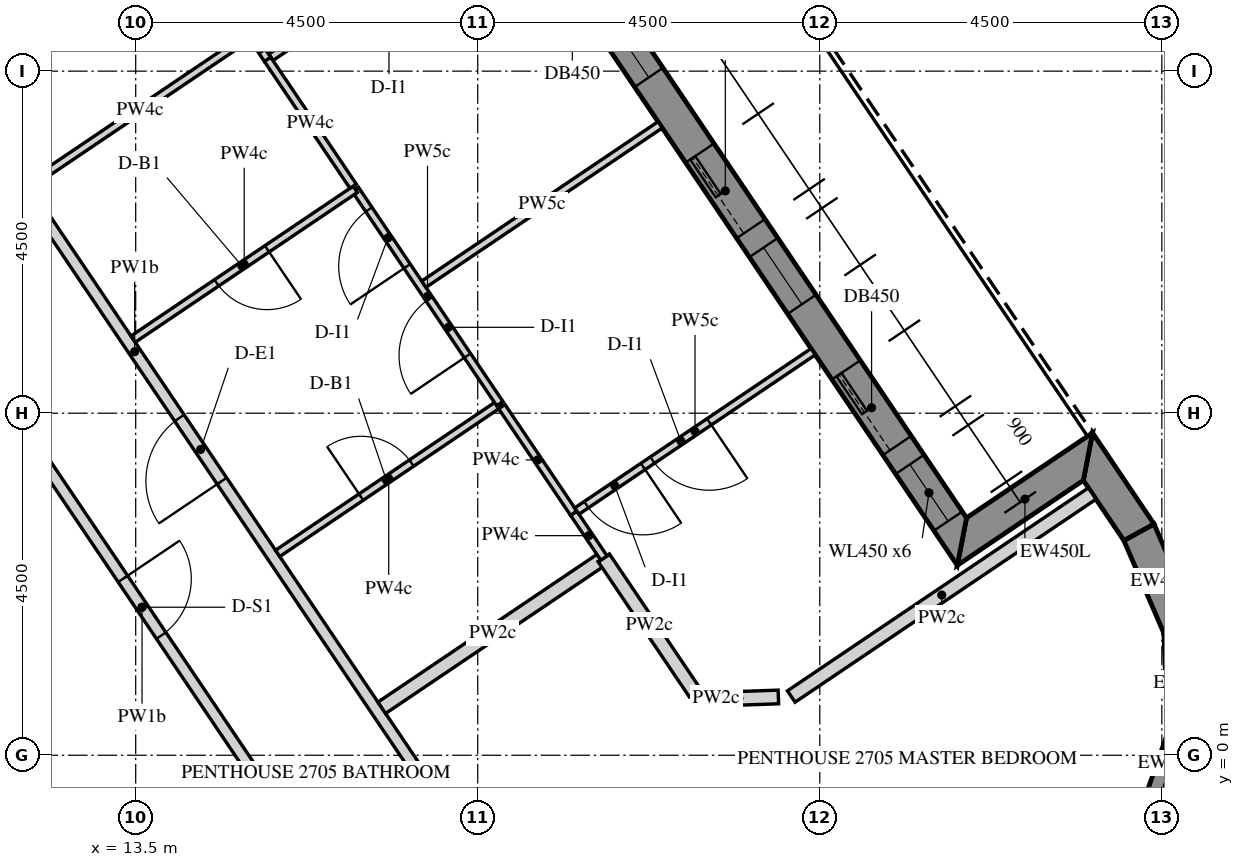
"""IFC4 building model, lengths in metres.
Left out: names, types, materials, properties, quantities, classifications, styles, units other than length and angle.
Written with IfcOpenShell. Run it as: python <this file> out.ifc"""

import sys

from ifc_helpers import new_model, si_unit, direction, frame, frame_2d, origin, place, context, subcontext, project, spatial, polyline, rectangle, outline, extrude, element, fill, save


model = new_model("IFC4")
c1 = context("Model", 3, precision=1e-05, world=origin(), true_north=direction((0.0, 1.0)))
c2 = subcontext(c1, "Body", "Model", "MODEL_VIEW")
j1 = project(units=[si_unit("LENGTHUNIT", "METRE"), si_unit("PLANEANGLEUNIT", "RADIAN")], contexts=[c1])
p1 = place(None, origin())
s1 = spatial("IfcSite", under=j1, at=p1, CompositionType="ELEMENT")
p2 = place(p1, origin())
s2 = spatial("IfcBuilding", under=s1, at=p2, CompositionType="ELEMENT")
p3 = place(p2, frame((0.0, 0.0, 353.4)))
s3 = spatial("IfcBuildingStorey", under=s2, at=p3, CompositionType="ELEMENT", Elevation=353.4)
p4 = place(p3, frame((26.838, -1.064, -0.15), z_axis=(0.0, 0.0, 1.0), x_axis=(0.331074067573, 0.943604769901, 0.0)))
e1 = element("IfcWall", 1, at=p4, inside=s3, PredefinedType="SOLIDWALL", context=c2, shape_type="SweptSolid", body=[
    extrude(outline(polyline([(-0.021, -0.225), (1.44, -0.225), (1.355, 0.225), (0.021, 0.225), (-0.021, -0.225)])), origin(), (0.0, 0.0, 1.0), 3.9),
])
p5 = place(p3, frame((27.301, 0.254, -0.15), z_axis=(0.0, 0.0, 1.0), x_axis=(-0.034763104447, 0.999395580623, 0.0)))
e2 = element("IfcWall", 2, at=p5, inside=s3, PredefinedType="SOLIDWALL", context=c2, shape_type="SweptSolid", body=[
    extrude(outline(polyline([(-0.042, -0.225), (1.44, -0.225), (1.355, 0.225), (0.042, 0.225), (-0.042, -0.225)])), origin(), (0.0, 0.0, 1.0), 3.9),
])
p6 = place(p3, frame((27.252, 1.651, -0.15), z_axis=(0.0, 0.0, 1.0), x_axis=(-0.396195073027, 0.918166359713, 0.0)))
e3 = element("IfcWall", 3, at=p6, inside=s3, PredefinedType="SOLIDWALL", context=c2, shape_type="SweptSolid", body=[
    extrude(outline(polyline([(-0.042, -0.225), (1.418, -0.225), (1.376, 0.225), (0.042, 0.225), (-0.042, -0.225)])), origin(), (0.0, 0.0, 1.0), 3.9),
])
p7 = place(p3, frame((26.699, 2.934, -0.15), z_axis=(0.0, 0.0, 1.0), x_axis=(-0.559105892217, 0.829096255744, 0.0)))
e4 = element("IfcWall", 4, at=p7, inside=s3, PredefinedType="SOLIDWALL", context=c2, shape_type="SweptSolid", body=[
    extrude(outline(polyline([(-0.021, -0.225), (1.425, -0.225), (0.975, 0.225), (0.021, 0.225), (-0.021, -0.225)])), origin(), (0.0, 0.0, 1.0), 3.9),
])
p8 = place(p3, frame((26.028, 3.929, -0.15), z_axis=(0.0, 0.0, 1.0), x_axis=(-0.829052389485, -0.559170935841, 0.0)))
e5 = element("IfcWall", 5, at=p8, inside=s3, PredefinedType="SOLIDWALL", context=c2, shape_type="SweptSolid", body=[
    extrude(outline(polyline([(-0.225, -0.225), (1.775, -0.225), (2.225, 0.225), (0.225, 0.225), (-0.225, -0.225)])), origin(), (0.0, 0.0, 1.0), 3.9),
])
p9 = place(p3, frame((24.37, 2.811, -0.15), z_axis=(0.0, 0.0, 1.0), x_axis=(-0.559187034749, 0.829041531027, 0.0)))
e6 = element("IfcWall", 6, at=p9, inside=s3, PredefinedType="SOLIDWALL", context=c2, shape_type="SweptSolid", body=[
    extrude(outline(polyline([(0.225, -0.225), (20.506, -0.225), (20.957, 0.225), (-0.225, 0.225), (0.225, -0.225)])), origin(), (0.0, 0.0, 1.0), 3.9),
])
p10 = place(p9, frame((0.325, 0.0, 1.05)))
e7 = element("IfcOpeningElement", 7, at=p10, cuts=e6, PredefinedType="OPENING", context=c2, shape_type="SweptSolid", body=[
    extrude(rectangle(XDim=0.9, YDim=1.5, at=frame_2d((0.45, 0.75))), frame((0.0, 0.235, 0.0), z_axis=(0.0, -1.0, 0.0), x_axis=(1.0, 0.0, 0.0)), (0.0, 0.0, 1.0), 0.47),
])
p11 = place(p9, frame((1.525, 0.0, 0.15)))
e8 = element("IfcOpeningElement", 8, at=p11, cuts=e6, PredefinedType="OPENING", context=c2, shape_type="SweptSolid", body=[
    extrude(rectangle(XDim=1.2, YDim=2.4, at=frame_2d((0.6, 1.2))), frame((0.0, 0.235, 0.0), z_axis=(0.0, -1.0, 0.0), x_axis=(1.0, 0.0, 0.0)), (0.0, 0.0, 1.0), 0.47),
])
p12 = place(p9, frame((3.766, 0.0, 1.05)))
e9 = element("IfcOpeningElement", 9, at=p12, cuts=e6, PredefinedType="OPENING", context=c2, shape_type="SweptSolid", body=[
    extrude(rectangle(XDim=0.9, YDim=1.5, at=frame_2d((0.45, 0.75))), frame((0.0, 0.235, 0.0), z_axis=(0.0, -1.0, 0.0), x_axis=(1.0, 0.0, 0.0)), (0.0, 0.0, 1.0), 0.47),
])
p13 = place(p9, frame((4.966, 0.0, 0.15)))
e10 = element("IfcOpeningElement", 10, at=p13, cuts=e6, PredefinedType="OPENING", context=c2, shape_type="SweptSolid", body=[
    extrude(rectangle(XDim=1.2, YDim=2.4, at=frame_2d((0.6, 1.2))), frame((0.0, 0.235, 0.0), z_axis=(0.0, -1.0, 0.0), x_axis=(1.0, 0.0, 0.0)), (0.0, 0.0, 1.0), 0.47),
])
p14 = place(p9, frame((7.366, 0.0, 1.05)))
e11 = element("IfcOpeningElement", 11, at=p14, cuts=e6, PredefinedType="OPENING", context=c2, shape_type="SweptSolid", body=[
    extrude(rectangle(XDim=0.9, YDim=1.5, at=frame_2d((0.45, 0.75))), frame((0.0, 0.235, 0.0), z_axis=(0.0, -1.0, 0.0), x_axis=(1.0, 0.0, 0.0)), (0.0, 0.0, 1.0), 0.47),
])
p15 = place(p9, frame((8.566, 0.0, 0.15)))
e12 = element("IfcOpeningElement", 12, at=p15, cuts=e6, PredefinedType="OPENING", context=c2, shape_type="SweptSolid", body=[
    extrude(rectangle(XDim=1.2, YDim=2.4, at=frame_2d((0.6, 1.2))), frame((0.0, 0.235, 0.0), z_axis=(0.0, -1.0, 0.0), x_axis=(1.0, 0.0, 0.0)), (0.0, 0.0, 1.0), 0.47),
])
p16 = place(p9, frame((10.966, 0.0, 1.05)))
e13 = element("IfcOpeningElement", 13, at=p16, cuts=e6, PredefinedType="OPENING", context=c2, shape_type="SweptSolid", body=[
    extrude(rectangle(XDim=0.9, YDim=1.5, at=frame_2d((0.45, 0.75))), frame((0.0, 0.235, 0.0), z_axis=(0.0, -1.0, 0.0), x_axis=(1.0, 0.0, 0.0)), (0.0, 0.0, 1.0), 0.47),
])
p17 = place(p9, frame((12.166, 0.0, 0.15)))
e14 = element("IfcOpeningElement", 14, at=p17, cuts=e6, PredefinedType="OPENING", context=c2, shape_type="SweptSolid", body=[
    extrude(rectangle(XDim=1.2, YDim=2.4, at=frame_2d((0.6, 1.2))), frame((0.0, 0.235, 0.0), z_axis=(0.0, -1.0, 0.0), x_axis=(1.0, 0.0, 0.0)), (0.0, 0.0, 1.0), 0.47),
])
p18 = place(p9, frame((14.566, 0.0, 1.05)))
e15 = element("IfcOpeningElement", 15, at=p18, cuts=e6, PredefinedType="OPENING", context=c2, shape_type="SweptSolid", body=[
    extrude(rectangle(XDim=0.9, YDim=1.5, at=frame_2d((0.45, 0.75))), frame((0.0, 0.235, 0.0), z_axis=(0.0, -1.0, 0.0), x_axis=(1.0, 0.0, 0.0)), (0.0, 0.0, 1.0), 0.47),
])
p19 = place(p9, frame((15.766, 0.0, 0.15)))
e16 = element("IfcOpeningElement", 16, at=p19, cuts=e6, PredefinedType="OPENING", context=c2, shape_type="SweptSolid", body=[
    extrude(rectangle(XDim=1.2, YDim=2.4, at=frame_2d((0.6, 1.2))), frame((0.0, 0.235, 0.0), z_axis=(0.0, -1.0, 0.0), x_axis=(1.0, 0.0, 0.0)), (0.0, 0.0, 1.0), 0.47),
])
p20 = place(p9, frame((18.007, 0.0, 1.05)))
e17 = element("IfcOpeningElement", 17, at=p20, cuts=e6, PredefinedType="OPENING", context=c2, shape_type="SweptSolid", body=[
    extrude(rectangle(XDim=0.9, YDim=1.5, at=frame_2d((0.45, 0.75))), frame((0.0, 0.235, 0.0), z_axis=(0.0, -1.0, 0.0), x_axis=(1.0, 0.0, 0.0)), (0.0, 0.0, 1.0), 0.47),
])
p21 = place(p9, frame((19.207, 0.0, 0.15)))
e18 = element("IfcOpeningElement", 18, at=p21, cuts=e6, PredefinedType="OPENING", context=c2, shape_type="SweptSolid", body=[
    extrude(rectangle(XDim=1.2, YDim=2.4, at=frame_2d((0.6, 1.2))), frame((0.0, 0.235, 0.0), z_axis=(0.0, -1.0, 0.0), x_axis=(1.0, 0.0, 0.0)), (0.0, 0.0, 1.0), 0.47),
])
p22 = place(p3, frame((17.873, -1.193, 0.0), z_axis=(0.0, 0.0, 1.0), x_axis=(-0.559195650252, 0.829035719821, 0.0)))
e19 = element("IfcWall", 19, at=p22, inside=s3, PredefinedType="PARTITIONING", context=c2, shape_type="SweptSolid", body=[
    extrude(rectangle(XDim=15.688, YDim=0.15, at=frame_2d((7.844, 0.0))), origin(), (0.0, 0.0, 1.0), 2.82),
])
p23 = place(p22, frame((5.792, 0.0, 0.0)))
e20 = element("IfcOpeningElement", 20, at=p23, cuts=e19, PredefinedType="OPENING", context=c2, shape_type="SweptSolid", body=[
    extrude(rectangle(XDim=1.0, YDim=2.1, at=frame_2d((0.5, 1.05))), frame((0.0, 0.085, 0.0), z_axis=(0.0, -1.0, 0.0), x_axis=(1.0, 0.0, 0.0)), (0.0, 0.0, 1.0), 0.17),
])
p24 = place(p3, frame((11.368, 5.231, 0.0), z_axis=(0.0, 0.0, 1.0), x_axis=(0.55919388604, -0.829036909803, 0.0)))
e21 = element("IfcWall", 21, at=p24, inside=s3, PredefinedType="PARTITIONING", context=c2, shape_type="SweptSolid", body=[
    extrude(rectangle(XDim=7.922, YDim=0.15, at=frame_2d((3.961, 0.0))), origin(), (0.0, 0.0, 1.0), 2.82),
])
p25 = place(p24, frame((3.511, 0.0, 0.0)))
e22 = element("IfcOpeningElement", 22, at=p25, cuts=e21, PredefinedType="OPENING", context=c2, shape_type="SweptSolid", body=[
    extrude(rectangle(XDim=0.9, YDim=2.1, at=frame_2d((0.45, 1.05))), frame((0.0, 0.085, 0.0), z_axis=(0.0, -1.0, 0.0), x_axis=(1.0, 0.0, 0.0)), (0.0, 0.0, 1.0), 0.17),
])
p26 = place(p3, frame((19.66, 2.595, 0.0), z_axis=(0.0, 0.0, 1.0), x_axis=(-0.829033300448, -0.559199237078, 0.0)))
e23 = element("IfcWall", 23, at=p26, inside=s3, PredefinedType="PARTITIONING", context=c2, shape_type="SweptSolid", body=[
    extrude(rectangle(XDim=3.525, YDim=0.18, at=frame_2d((1.763, 0.0))), origin(), (0.0, 0.0, 1.0), 2.82),
])
p27 = place(p3, frame((26.084, 3.443, 0.0), z_axis=(0.0, 0.0, 1.0), x_axis=(-0.829033545972, -0.559198873079, 0.0)))
e24 = element("IfcWall", 24, at=p27, inside=s3, PredefinedType="PARTITIONING", context=c2, shape_type="SweptSolid", body=[
    extrude(rectangle(XDim=4.775, YDim=0.18, at=frame_2d((2.388, 0.0))), origin(), (0.0, 0.0, 1.0), 2.82),
])
p28 = place(p3, frame((21.955, 0.767, 0.0), z_axis=(0.0, 0.0, 1.0), x_axis=(-0.999394211814, -0.034802433729, 0.0)))
e25 = element("IfcWall", 25, at=p28, inside=s3, PredefinedType="PARTITIONING", context=c2, shape_type="SweptSolid", body=[
    extrude(rectangle(XDim=1.038, YDim=0.18, at=frame_2d((0.519, 0.0))), origin(), (0.0, 0.0, 1.0), 2.82),
])
p29 = place(p3, frame((20.858, 0.818, 0.0), z_axis=(0.0, 0.0, 1.0), x_axis=(-0.55920528272, 0.829029222512, 0.0)))
e26 = element("IfcWall", 26, at=p29, inside=s3, PredefinedType="PARTITIONING", context=c2, shape_type="SweptSolid", body=[
    extrude(rectangle(XDim=2.147, YDim=0.18, at=frame_2d((1.074, 0.0))), origin(), (0.0, 0.0, 1.0), 2.82),
])
p30 = place(p3, frame((15.278, 9.181, 0.0), z_axis=(0.0, 0.0, 1.0), x_axis=(0.829043350963, 0.559184336534, 0.0)))
e27 = element("IfcWall", 27, at=p30, inside=s3, PredefinedType="PARTITIONING", context=c2, shape_type="SweptSolid", body=[
    extrude(rectangle(XDim=3.75, YDim=0.1, at=frame_2d((1.875, 0.0))), origin(), (0.0, 0.0, 1.0), 2.82),
])
p31 = place(p30, frame((1.425, 0.0, 0.0)))
e28 = element("IfcOpeningElement", 28, at=p31, cuts=e27, PredefinedType="OPENING", context=c2, shape_type="SweptSolid", body=[
    extrude(rectangle(XDim=0.9, YDim=2.1, at=frame_2d((0.45, 1.05))), frame((0.0, 0.06, 0.0), z_axis=(0.0, -1.0, 0.0), x_axis=(1.0, 0.0, 0.0)), (0.0, 0.0, 1.0), 0.12),
])
p32 = place(p3, frame((12.096, 7.505, 0.0), z_axis=(0.0, 0.0, 1.0), x_axis=(0.829065408555, 0.559151632687, 0.0)))
e29 = element("IfcWall", 29, at=p32, inside=s3, PredefinedType="PARTITIONING", context=c2, shape_type="SweptSolid", body=[
    extrude(rectangle(XDim=3.525, YDim=0.1, at=frame_2d((1.762, 0.0))), origin(), (0.0, 0.0, 1.0), 2.82),
])
p33 = place(p3, frame((15.046, 9.435, 0.0), z_axis=(0.0, 0.0, 1.0), x_axis=(0.559141668278, -0.829072128826, 0.0)))
e30 = element("IfcWall", 30, at=p33, inside=s3, PredefinedType="PARTITIONING", context=c2, shape_type="SweptSolid", body=[
    extrude(rectangle(XDim=0.342, YDim=0.1, at=frame_2d((0.171, 0.0))), origin(), (0.0, 0.0, 1.0), 2.82),
])
p34 = place(p3, frame((15.367, 2.655, 0.0), z_axis=(0.0, 0.0, 1.0), x_axis=(0.829033300448, 0.559199237078, 0.0)))
e31 = element("IfcWall", 31, at=p34, inside=s3, PredefinedType="PARTITIONING", context=c2, shape_type="SweptSolid", body=[
    extrude(rectangle(XDim=3.525, YDim=0.1, at=frame_2d((1.763, 0.0))), origin(), (0.0, 0.0, 1.0), 2.82),
])
p35 = place(p34, frame((1.325, 0.0, 0.0)))
e32 = element("IfcOpeningElement", 32, at=p35, cuts=e31, PredefinedType="OPENING", context=c2, shape_type="SweptSolid", body=[
    extrude(rectangle(XDim=0.8, YDim=2.1, at=frame_2d((0.4, 1.05))), frame((0.0, 0.06, 0.0), z_axis=(0.0, -1.0, 0.0), x_axis=(1.0, 0.0, 0.0)), (0.0, 0.0, 1.0), 0.12),
])
p36 = place(p3, frame((18.291, 4.625, 0.0), z_axis=(0.0, 0.0, 1.0), x_axis=(-0.55916115895, 0.82905898362, 0.0)))
e33 = element("IfcWall", 33, at=p36, inside=s3, PredefinedType="PARTITIONING", context=c2, shape_type="SweptSolid", body=[
    extrude(rectangle(XDim=3.404, YDim=0.1, at=frame_2d((1.702, 0.0))), origin(), (0.0, 0.0, 1.0), 2.82),
])
p37 = place(p36, frame((0.762, 0.0, 0.0)))
e34 = element("IfcOpeningElement", 34, at=p37, cuts=e33, PredefinedType="OPENING", context=c2, shape_type="SweptSolid", body=[
    extrude(rectangle(XDim=0.9, YDim=2.1, at=frame_2d((0.45, 1.05))), frame((0.0, 0.06, 0.0), z_axis=(0.0, -1.0, 0.0), x_axis=(1.0, 0.0, 0.0)), (0.0, 0.0, 1.0), 0.12),
])
p38 = place(p36, frame((2.182, 0.0, 0.0)))
e35 = element("IfcOpeningElement", 35, at=p38, cuts=e33, PredefinedType="OPENING", context=c2, shape_type="SweptSolid", body=[
    extrude(rectangle(XDim=0.9, YDim=2.1, at=frame_2d((0.45, 1.05))), frame((0.0, 0.06, 0.0), z_axis=(0.0, -1.0, 0.0), x_axis=(1.0, 0.0, 0.0)), (0.0, 0.0, 1.0), 0.12),
])
p39 = place(p3, frame((16.388, 7.445, 0.0), z_axis=(0.0, 0.0, 1.0), x_axis=(-0.829033300448, -0.559199237078, 0.0)))
e36 = element("IfcWall", 36, at=p39, inside=s3, PredefinedType="PARTITIONING", context=c2, shape_type="SweptSolid", body=[
    extrude(rectangle(XDim=3.525, YDim=0.1, at=frame_2d((1.763, 0.0))), origin(), (0.0, 0.0, 1.0), 2.82),
])
p40 = place(p39, frame((1.4, 0.0, 0.0)))
e37 = element("IfcOpeningElement", 37, at=p40, cuts=e36, PredefinedType="OPENING", context=c2, shape_type="SweptSolid", body=[
    extrude(rectangle(XDim=0.8, YDim=2.1, at=frame_2d((0.4, 1.05))), frame((0.0, 0.06, 0.0), z_axis=(0.0, -1.0, 0.0), x_axis=(1.0, 0.0, 0.0)), (0.0, 0.0, 1.0), 0.12),
])
p41 = place(p3, frame((19.661, 2.594, 0.0), z_axis=(0.0, 0.0, 1.0), x_axis=(-0.559278611344, 0.828979755418, 0.0)))
e38 = element("IfcWall", 38, at=p41, inside=s3, PredefinedType="PARTITIONING", context=c2, shape_type="SweptSolid", body=[
    extrude(rectangle(XDim=0.712, YDim=0.1, at=frame_2d((0.356, 0.0))), origin(), (0.0, 0.0, 1.0), 2.82),
])
p42 = place(p3, frame((19.262, 3.184, 0.0), z_axis=(0.0, 0.0, 1.0), x_axis=(-0.559155511525, 0.829062792514, 0.0)))
e39 = element("IfcWall", 39, at=p42, inside=s3, PredefinedType="PARTITIONING", context=c2, shape_type="SweptSolid", body=[
    extrude(rectangle(XDim=1.691, YDim=0.1, at=frame_2d((0.846, 0.0))), origin(), (0.0, 0.0, 1.0), 2.82),
])
p43 = place(p3, frame((22.413, 5.309, 0.0), z_axis=(0.0, 0.0, 1.0), x_axis=(-0.829013169089, -0.559229081394, 0.0)))
e40 = element("IfcWall", 40, at=p43, inside=s3, PredefinedType="PARTITIONING", context=c2, shape_type="SweptSolid", body=[
    extrude(rectangle(XDim=3.75, YDim=0.1, at=frame_2d((1.875, 0.0))), origin(), (0.0, 0.0, 1.0), 2.82),
])
p44 = place(p43, frame((2.7, 0.0, 0.0)))
e41 = element("IfcOpeningElement", 41, at=p44, cuts=e40, PredefinedType="OPENING", context=c2, shape_type="SweptSolid", body=[
    extrude(rectangle(XDim=0.9, YDim=2.1, at=frame_2d((0.45, 1.05))), frame((0.0, 0.06, 0.0), z_axis=(0.0, -1.0, 0.0), x_axis=(1.0, 0.0, 0.0)), (0.0, 0.0, 1.0), 0.12),
])
p45 = place(p43, frame((1.65, 0.0, 0.0)))
e42 = element("IfcOpeningElement", 42, at=p45, cuts=e40, PredefinedType="OPENING", context=c2, shape_type="SweptSolid", body=[
    extrude(rectangle(XDim=0.9, YDim=2.1, at=frame_2d((0.45, 1.05))), frame((0.0, 0.06, 0.0), z_axis=(0.0, -1.0, 0.0), x_axis=(1.0, 0.0, 0.0)), (0.0, 0.0, 1.0), 0.12),
])
p46 = place(p3, frame((20.4, 8.294, 0.0), z_axis=(0.0, 0.0, 1.0), x_axis=(-0.829043350963, -0.559184336534, 0.0)))
e43 = element("IfcWall", 43, at=p46, inside=s3, PredefinedType="PARTITIONING", context=c2, shape_type="SweptSolid", body=[
    extrude(rectangle(XDim=3.75, YDim=0.1, at=frame_2d((1.875, 0.0))), origin(), (0.0, 0.0, 1.0), 2.82),
])
p47 = place(p3, frame((15.235, 9.155, 0.0), z_axis=(0.0, 0.0, 1.0), x_axis=(0.559199850123, -0.829032886937, 0.0)))
e44 = element("IfcWall", 44, at=p47, inside=s3, PredefinedType="PARTITIONING", context=c2, shape_type="SweptSolid", body=[
    extrude(rectangle(XDim=2.012, YDim=0.1, at=frame_2d((1.006, 0.0))), origin(), (0.0, 0.0, 1.0), 2.82),
])
p48 = place(p10, frame((0.0, 0.155, 0.0)))
e45 = element("IfcWindow", 45, at=p48, inside=s3, PartitioningType="SINGLE_PANEL", PredefinedType="WINDOW", context=c2, shape_type="SweptSolid", body=[
    extrude(rectangle(XDim=0.9, YDim=1.5, at=frame_2d((0.45, 0.75))), frame((0.0, 0.03, 0.0), z_axis=(0.0, -1.0, 0.0), x_axis=(1.0, 0.0, 0.0)), (0.0, 0.0, 1.0), 0.06),
])
fill(e7, e45)
p49 = place(p11, frame((0.0, 0.15, 0.0)))
e46 = element("IfcDoor", 46, at=p49, inside=s3, OperationType="SLIDING_TO_LEFT", PredefinedType="DOOR", context=c2, shape_type="SweptSolid", body=[
    extrude(rectangle(XDim=1.2, YDim=2.4, at=frame_2d((0.6, 1.2))), frame((0.0, 0.025, 0.0), z_axis=(0.0, -1.0, 0.0), x_axis=(1.0, 0.0, 0.0)), (0.0, 0.0, 1.0), 0.05),
])
fill(e8, e46)
p50 = place(p12, frame((0.0, 0.155, 0.0)))
e47 = element("IfcWindow", 47, at=p50, inside=s3, PartitioningType="SINGLE_PANEL", PredefinedType="WINDOW", context=c2, shape_type="SweptSolid", body=[
    extrude(rectangle(XDim=0.9, YDim=1.5, at=frame_2d((0.45, 0.75))), frame((0.0, 0.03, 0.0), z_axis=(0.0, -1.0, 0.0), x_axis=(1.0, 0.0, 0.0)), (0.0, 0.0, 1.0), 0.06),
])
fill(e9, e47)
p51 = place(p13, frame((0.0, 0.15, 0.0)))
e48 = element("IfcDoor", 48, at=p51, inside=s3, OperationType="SLIDING_TO_LEFT", PredefinedType="DOOR", context=c2, shape_type="SweptSolid", body=[
    extrude(rectangle(XDim=1.2, YDim=2.4, at=frame_2d((0.6, 1.2))), frame((0.0, 0.025, 0.0), z_axis=(0.0, -1.0, 0.0), x_axis=(1.0, 0.0, 0.0)), (0.0, 0.0, 1.0), 0.05),
])
fill(e10, e48)
p52 = place(p14, frame((0.0, 0.155, 0.0)))
e49 = element("IfcWindow", 49, at=p52, inside=s3, PartitioningType="SINGLE_PANEL", PredefinedType="WINDOW", context=c2, shape_type="SweptSolid", body=[
    extrude(rectangle(XDim=0.9, YDim=1.5, at=frame_2d((0.45, 0.75))), frame((0.0, 0.03, 0.0), z_axis=(0.0, -1.0, 0.0), x_axis=(1.0, 0.0, 0.0)), (0.0, 0.0, 1.0), 0.06),
])
fill(e11, e49)
p53 = place(p23, origin())
e50 = element("IfcDoor", 50, at=p53, inside=s3, OperationType="SINGLE_SWING_LEFT", PredefinedType="DOOR", context=c2, shape_type="SweptSolid", body=[
    extrude(rectangle(XDim=1.0, YDim=2.1, at=frame_2d((0.5, 1.05))), frame((0.0, 0.025, 0.0), z_axis=(0.0, -1.0, 0.0), x_axis=(1.0, 0.0, 0.0)), (0.0, 0.0, 1.0), 0.05),
])
fill(e20, e50)
p54 = place(p35, origin())
e51 = element("IfcDoor", 51, at=p54, inside=s3, OperationType="SINGLE_SWING_RIGHT", PredefinedType="DOOR", context=c2, shape_type="SweptSolid", body=[
    extrude(rectangle(XDim=0.8, YDim=2.1, at=frame_2d((0.4, 1.05))), frame((0.0, 0.025, 0.0), z_axis=(0.0, -1.0, 0.0), x_axis=(1.0, 0.0, 0.0)), (0.0, 0.0, 1.0), 0.05),
])
fill(e32, e51)
p55 = place(p37, origin())
e52 = element("IfcDoor", 52, at=p55, inside=s3, OperationType="SINGLE_SWING_LEFT", PredefinedType="DOOR", context=c2, shape_type="SweptSolid", body=[
    extrude(rectangle(XDim=0.9, YDim=2.1, at=frame_2d((0.45, 1.05))), frame((0.0, 0.025, 0.0), z_axis=(0.0, -1.0, 0.0), x_axis=(1.0, 0.0, 0.0)), (0.0, 0.0, 1.0), 0.05),
])
fill(e34, e52)
p56 = place(p44, origin())
e53 = element("IfcDoor", 53, at=p56, inside=s3, OperationType="SINGLE_SWING_RIGHT", PredefinedType="DOOR", context=c2, shape_type="SweptSolid", body=[
    extrude(rectangle(XDim=0.9, YDim=2.1, at=frame_2d((0.45, 1.05))), frame((0.0, 0.025, 0.0), z_axis=(0.0, -1.0, 0.0), x_axis=(1.0, 0.0, 0.0)), (0.0, 0.0, 1.0), 0.05),
])
fill(e41, e53)
p57 = place(p45, origin())
e54 = element("IfcDoor", 54, at=p57, inside=s3, OperationType="SINGLE_SWING_LEFT", PredefinedType="DOOR", context=c2, shape_type="SweptSolid", body=[
    extrude(rectangle(XDim=0.9, YDim=2.1, at=frame_2d((0.45, 1.05))), frame((0.0, 0.025, 0.0), z_axis=(0.0, -1.0, 0.0), x_axis=(1.0, 0.0, 0.0)), (0.0, 0.0, 1.0), 0.05),
])
fill(e42, e54)
p58 = place(p38, origin())
e55 = element("IfcDoor", 55, at=p58, inside=s3, OperationType="SINGLE_SWING_LEFT", PredefinedType="DOOR", context=c2, shape_type="SweptSolid", body=[
    extrude(rectangle(XDim=0.9, YDim=2.1, at=frame_2d((0.45, 1.05))), frame((0.0, 0.025, 0.0), z_axis=(0.0, -1.0, 0.0), x_axis=(1.0, 0.0, 0.0)), (0.0, 0.0, 1.0), 0.05),
])
fill(e35, e55)
p59 = place(p40, origin())
e56 = element("IfcDoor", 56, at=p59, inside=s3, OperationType="SINGLE_SWING_LEFT", PredefinedType="DOOR", context=c2, shape_type="SweptSolid", body=[
    extrude(rectangle(XDim=0.8, YDim=2.1, at=frame_2d((0.4, 1.05))), frame((0.0, 0.025, 0.0), z_axis=(0.0, -1.0, 0.0), x_axis=(1.0, 0.0, 0.0)), (0.0, 0.0, 1.0), 0.05),
])
fill(e37, e56)
p60 = place(p25, origin())
e57 = element("IfcDoor", 57, at=p60, inside=s3, OperationType="SINGLE_SWING_RIGHT", PredefinedType="DOOR", context=c2, shape_type="SweptSolid", body=[
    extrude(rectangle(XDim=0.9, YDim=2.1, at=frame_2d((0.45, 1.05))), frame((0.0, 0.025, 0.0), z_axis=(0.0, -1.0, 0.0), x_axis=(1.0, 0.0, 0.0)), (0.0, 0.0, 1.0), 0.05),
])
fill(e22, e57)
save(model, sys.argv[1])
